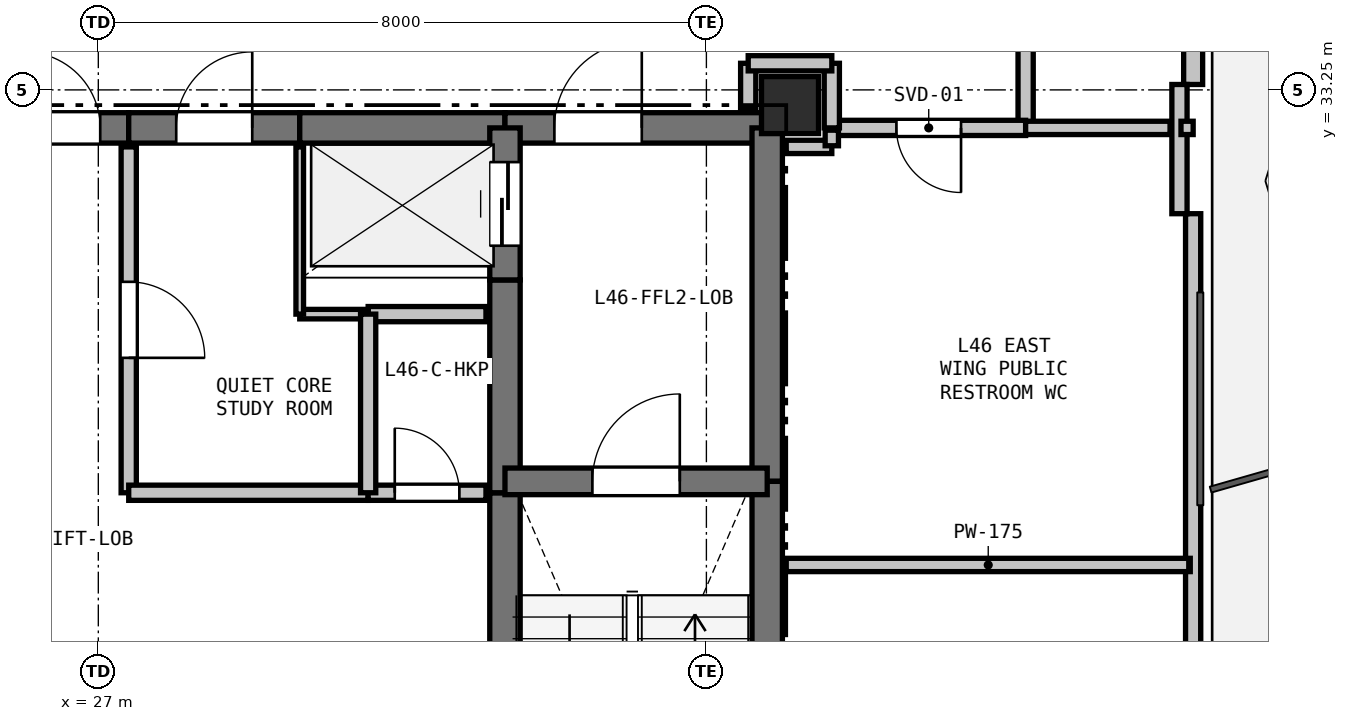
"""IFC4 building model, lengths in metres.
Left out: names, types, materials, properties, quantities, classifications, styles, units other than length and angle.
Written with IfcOpenShell. Run it as: python <this file> out.ifc"""

import sys

from ifc_helpers import new_model, si_unit, direction, frame, frame_2d, origin, origin_2d, place, context, subcontext, project, spatial, rectangle, extrude, element, fill, save


model = new_model("IFC4")
c1 = context("Model", 3, precision=1e-05, world=origin(), true_north=direction((0.0, 1.0)))
c2 = subcontext(c1, "Body", "Model", "MODEL_VIEW")
j1 = project(units=[si_unit("LENGTHUNIT", "METRE"), si_unit("PLANEANGLEUNIT", "RADIAN")], contexts=[c1])
p1 = place(None, origin())
s1 = spatial("IfcSite", under=j1, at=p1, CompositionType="ELEMENT")
p2 = place(p1, origin())
s2 = spatial("IfcBuilding", under=s1, at=p2, CompositionType="ELEMENT")
p3 = place(p2, frame((0.0, 0.0, 167.4)))
s3 = spatial("IfcBuildingStorey", under=s2, at=p3, CompositionType="ELEMENT", Elevation=167.4)
p4 = place(p3, frame((36.1, 33.05, 0.0), z_axis=(0.0, 0.0, 1.0), x_axis=(1.0, 0.0, 0.0)))
e1 = element("IfcColumn", 1, at=p4, inside=s3, PredefinedType="COLUMN", context=c2, shape_type="SweptSolid", body=[
    extrude(rectangle(XDim=0.75, YDim=0.75, at=origin_2d()), origin(), (0.0, 0.0, 1.0), 3.3),
])
p5 = place(p3, frame((41.404, 43.764, 0.0), z_axis=(0.0, 0.0, 1.0), x_axis=(0.0, -1.0, 0.0)))
e2 = element("IfcWall", 2, at=p5, inside=s3, PredefinedType="SOLIDWALL", context=c2, shape_type="SweptSolid", body=[
    extrude(rectangle(XDim=10.442, YDim=0.25, at=frame_2d((5.221, 0.0))), origin(), (0.0, 0.0, 1.0), 2.64),
])
p6 = place(p5, frame((1.879, 0.0, 0.0)))
e3 = element("IfcOpeningElement", 3, at=p6, cuts=e2, PredefinedType="OPENING", context=c2, shape_type="SweptSolid", body=[
    extrude(rectangle(XDim=1.0, YDim=2.1, at=frame_2d((0.5, 1.05))), frame((0.0, 0.135, 0.0), z_axis=(0.0, -1.0, 0.0), x_axis=(1.0, 0.0, 0.0)), (0.0, 0.0, 1.0), 0.27),
])
p7 = place(p3, frame((41.404, 31.621, 0.0), z_axis=(0.0, 0.0, 1.0), x_axis=(0.0, -1.0, 0.0)))
e4 = element("IfcWall", 4, at=p7, inside=s3, PredefinedType="PARAPET", context=c2, shape_type="SweptSolid", body=[
    extrude(rectangle(XDim=9.742, YDim=0.2, at=frame_2d((4.871, 0.0))), origin(), (0.0, 0.0, 1.0), 0.2),
])
p8 = place(p3, frame((41.224, 33.321, 0.0), z_axis=(0.0, 0.0, 1.0), x_axis=(0.0, -1.0, 0.0)))
e5 = element("IfcWall", 5, at=p8, inside=s3, PredefinedType="PARAPET", context=c2, shape_type="SweptSolid", body=[
    extrude(rectangle(XDim=1.7, YDim=0.2, at=frame_2d((0.85, 0.0))), origin(), (0.0, 0.0, 1.0), 2.64),
])
p9 = place(p3, frame((25.65, 32.75, 0.0), z_axis=(0.0, 0.0, 1.0), x_axis=(1.0, 0.0, 0.0)))
e6 = element("IfcWall", 6, at=p9, inside=s3, PredefinedType="SHEAR", context=c2, shape_type="SweptSolid", body=[
    extrude(rectangle(XDim=1.75, YDim=0.4, at=frame_2d((0.875, 0.0))), origin(), (0.0, 0.0, 1.0), 3.02),
])
p10 = place(p9, frame((0.375, 0.0, 0.0)))
e7 = element("IfcOpeningElement", 7, at=p10, cuts=e6, PredefinedType="OPENING", context=c2, shape_type="SweptSolid", body=[
    extrude(rectangle(XDim=1.0, YDim=2.15, at=frame_2d((0.5, 1.075))), frame((0.0, 0.21, 0.0), z_axis=(0.0, -1.0, 0.0), x_axis=(1.0, 0.0, 0.0)), (0.0, 0.0, 1.0), 0.42),
])
p11 = place(p3, frame((27.4, 32.75, 0.0), z_axis=(0.0, 0.0, 1.0), x_axis=(1.0, 0.0, 0.0)))
e8 = element("IfcWall", 8, at=p11, inside=s3, PredefinedType="SHEAR", context=c2, shape_type="SweptSolid", body=[
    extrude(rectangle(XDim=2.25, YDim=0.4, at=frame_2d((1.125, 0.0))), origin(), (0.0, 0.0, 1.0), 3.02),
])
p12 = place(p11, frame((0.625, 0.0, 0.0)))
e9 = element("IfcOpeningElement", 9, at=p12, cuts=e8, PredefinedType="OPENING", context=c2, shape_type="SweptSolid", body=[
    extrude(rectangle(XDim=1.0, YDim=2.15, at=frame_2d((0.5, 1.075))), frame((0.0, 0.21, 0.0), z_axis=(0.0, -1.0, 0.0), x_axis=(1.0, 0.0, 0.0)), (0.0, 0.0, 1.0), 0.42),
])
p13 = place(p3, frame((29.65, 32.75, 0.0), z_axis=(0.0, 0.0, 1.0), x_axis=(1.0, 0.0, 0.0)))
e10 = element("IfcWall", 10, at=p13, inside=s3, PredefinedType="SHEAR", context=c2, shape_type="SweptSolid", body=[
    extrude(rectangle(XDim=2.7, YDim=0.4, at=frame_2d((1.35, 0.0))), origin(), (0.0, 0.0, 1.0), 3.02),
])
p14 = place(p3, frame((32.35, 32.75, 0.0), z_axis=(0.0, 0.0, 1.0), x_axis=(1.0, 0.0, 0.0)))
e11 = element("IfcWall", 11, at=p14, inside=s3, PredefinedType="SHEAR", context=c2, shape_type="SweptSolid", body=[
    extrude(rectangle(XDim=3.45, YDim=0.4, at=frame_2d((1.725, 0.0))), origin(), (0.0, 0.0, 1.0), 3.02),
])
p15 = place(p14, frame((0.65, 0.0, 0.0)))
e12 = element("IfcOpeningElement", 12, at=p15, cuts=e11, PredefinedType="OPENING", context=c2, shape_type="SweptSolid", body=[
    extrude(rectangle(XDim=1.15, YDim=2.15, at=frame_2d((0.575, 1.075))), frame((0.0, 0.21, 0.0), z_axis=(0.0, -1.0, 0.0), x_axis=(1.0, 0.0, 0.0)), (0.0, 0.0, 1.0), 0.42),
])
p16 = place(p3, frame((35.8, 32.75, 0.0), z_axis=(0.0, 0.0, 1.0), x_axis=(0.0, -1.0, 0.0)))
e13 = element("IfcWall", 13, at=p16, inside=s3, PredefinedType="SHEAR", context=c2, shape_type="SweptSolid", body=[
    extrude(rectangle(XDim=4.65, YDim=0.4, at=frame_2d((2.325, 0.0))), origin(), (0.0, 0.0, 1.0), 3.02),
])
p17 = place(p3, frame((35.8, 28.1, 0.0), z_axis=(0.0, 0.0, 1.0), x_axis=(0.0, -1.0, 0.0)))
e14 = element("IfcWall", 14, at=p17, inside=s3, PredefinedType="SHEAR", context=c2, shape_type="SweptSolid", body=[
    extrude(rectangle(XDim=7.35, YDim=0.4, at=frame_2d((3.675, 0.0))), origin(), (0.0, 0.0, 1.0), 3.02),
])
p18 = place(p3, frame((32.35, 25.55, 0.0), z_axis=(0.0, 0.0, 1.0), x_axis=(0.0, 1.0, 0.0)))
e15 = element("IfcWall", 15, at=p18, inside=s3, PredefinedType="SHEAR", context=c2, shape_type="SweptSolid", body=[
    extrude(rectangle(XDim=2.4, YDim=0.4, at=frame_2d((1.2, 0.0))), origin(), (0.0, 0.0, 1.0), 3.02),
])
p19 = place(p3, frame((32.35, 27.95, 0.0), z_axis=(0.0, 0.0, 1.0), x_axis=(0.0, 1.0, 0.0)))
e16 = element("IfcWall", 16, at=p19, inside=s3, PredefinedType="SHEAR", context=c2, shape_type="SweptSolid", body=[
    extrude(rectangle(XDim=2.8, YDim=0.4, at=frame_2d((1.4, 0.0))), origin(), (0.0, 0.0, 1.0), 3.02),
])
p20 = place(p3, frame((32.35, 30.75, 0.0), z_axis=(0.0, 0.0, 1.0), x_axis=(0.0, 1.0, 0.0)))
e17 = element("IfcWall", 17, at=p20, inside=s3, PredefinedType="SHEAR", context=c2, shape_type="SweptSolid", body=[
    extrude(rectangle(XDim=2.0, YDim=0.4, at=frame_2d((1.0, 0.0))), origin(), (0.0, 0.0, 1.0), 3.02),
])
p21 = place(p20, frame((0.45, 0.0, 0.0)))
e18 = element("IfcOpeningElement", 18, at=p21, cuts=e17, PredefinedType="OPENING", context=c2, shape_type="SweptSolid", body=[
    extrude(rectangle(XDim=1.1, YDim=2.15, at=frame_2d((0.55, 1.075))), frame((0.0, 0.21, 0.0), z_axis=(0.0, -1.0, 0.0), x_axis=(1.0, 0.0, 0.0)), (0.0, 0.0, 1.0), 0.42),
])
p22 = place(p3, frame((32.35, 28.1, 0.0), z_axis=(0.0, 0.0, 1.0), x_axis=(1.0, 0.0, 0.0)))
e19 = element("IfcWall", 19, at=p22, inside=s3, PredefinedType="SHEAR", context=c2, shape_type="SweptSolid", body=[
    extrude(rectangle(XDim=3.45, YDim=0.35, at=frame_2d((1.725, 0.0))), origin(), (0.0, 0.0, 1.0), 3.02),
])
p23 = place(p22, frame((1.15, 0.0, 0.0)))
e20 = element("IfcOpeningElement", 20, at=p23, cuts=e19, PredefinedType="OPENING", context=c2, shape_type="SweptSolid", body=[
    extrude(rectangle(XDim=1.15, YDim=2.15, at=frame_2d((0.575, 1.075))), frame((0.0, 0.185, 0.0), z_axis=(0.0, -1.0, 0.0), x_axis=(1.0, 0.0, 0.0)), (0.0, 0.0, 1.0), 0.37),
])
p24 = place(p3, frame((32.1, 30.3, 0.0), z_axis=(0.0, 0.0, 1.0), x_axis=(-1.0, 0.0, 0.0)))
e21 = element("IfcWall", 21, at=p24, inside=s3, PredefinedType="PARTITIONING", context=c2, shape_type="SweptSolid", body=[
    extrude(rectangle(XDim=1.55, YDim=0.2, at=frame_2d((0.775, 0.0))), origin(), (0.0, 0.0, 1.0), 3.02),
])
p25 = place(p3, frame((30.55, 30.3, 0.0), z_axis=(0.0, 0.0, 1.0), x_axis=(-1.0, 0.0, 0.0)))
e22 = element("IfcWall", 22, at=p25, inside=s3, PredefinedType="PARTITIONING", context=c2, shape_type="SweptSolid", body=[
    extrude(rectangle(XDim=0.9, YDim=0.125, at=frame_2d((0.45, 0.0))), origin(), (0.0, 0.0, 1.0), 3.02),
])
p26 = place(p3, frame((29.65, 30.3, 0.0), z_axis=(0.0, 0.0, 1.0), x_axis=(0.0, 1.0, 0.0)))
e23 = element("IfcWall", 23, at=p26, inside=s3, PredefinedType="PARTITIONING", context=c2, shape_type="SweptSolid", body=[
    extrude(rectangle(XDim=2.2, YDim=0.1, at=frame_2d((1.1, 0.0))), origin(), (0.0, 0.0, 1.0), 3.02),
])
p27 = place(p3, frame((27.4, 32.5, 0.0), z_axis=(0.0, 0.0, 1.0), x_axis=(0.0, -1.0, 0.0)))
e24 = element("IfcWall", 24, at=p27, inside=s3, PredefinedType="PARTITIONING", context=c2, shape_type="SweptSolid", body=[
    extrude(rectangle(XDim=4.55, YDim=0.2, at=frame_2d((2.275, 0.0))), origin(), (0.0, 0.0, 1.0), 3.02),
])
p28 = place(p27, frame((1.775, 0.0, 0.0)))
e25 = element("IfcOpeningElement", 25, at=p28, cuts=e24, PredefinedType="OPENING", context=c2, shape_type="SweptSolid", body=[
    extrude(rectangle(XDim=1.0, YDim=2.15, at=frame_2d((0.5, 1.075))), frame((0.0, 0.11, 0.0), z_axis=(0.0, -1.0, 0.0), x_axis=(1.0, 0.0, 0.0)), (0.0, 0.0, 1.0), 0.22),
])
p29 = place(p3, frame((27.4, 27.95, 0.0), z_axis=(0.0, 0.0, 1.0), x_axis=(1.0, 0.0, 0.0)))
e26 = element("IfcWall", 26, at=p29, inside=s3, PredefinedType="PARTITIONING", context=c2, shape_type="SweptSolid", body=[
    extrude(rectangle(XDim=3.15, YDim=0.2, at=frame_2d((1.575, 0.0))), origin(), (0.0, 0.0, 1.0), 3.02),
])
p30 = place(p3, frame((30.55, 27.95, 0.0), z_axis=(0.0, 0.0, 1.0), x_axis=(1.0, 0.0, 0.0)))
e27 = element("IfcWall", 27, at=p30, inside=s3, PredefinedType="PARTITIONING", context=c2, shape_type="SweptSolid", body=[
    extrude(rectangle(XDim=1.55, YDim=0.2, at=frame_2d((0.775, 0.0))), origin(), (0.0, 0.0, 1.0), 3.02),
])
p31 = place(p30, frame((0.35, 0.0, 0.0)))
e28 = element("IfcOpeningElement", 28, at=p31, cuts=e27, PredefinedType="OPENING", context=c2, shape_type="SweptSolid", body=[
    extrude(rectangle(XDim=0.85, YDim=2.1, at=frame_2d((0.425, 1.05))), frame((0.0, 0.11, 0.0), z_axis=(0.0, -1.0, 0.0), x_axis=(1.0, 0.0, 0.0)), (0.0, 0.0, 1.0), 0.22),
])
p32 = place(p3, frame((35.55, 33.6, 0.0), z_axis=(0.0, 0.0, 1.0), x_axis=(0.0, -1.0, 0.0)))
e29 = element("IfcWall", 29, at=p32, inside=s3, PredefinedType="PARTITIONING", context=c2, shape_type="SweptSolid", body=[
    extrude(rectangle(XDim=0.6, YDim=0.2, at=frame_2d((0.3, 0.0))), origin(), (0.0, 0.0, 1.0), 2.545),
])
p33 = place(p3, frame((39.2, 35.35, 0.0), z_axis=(0.0, 0.0, 1.0), x_axis=(0.0, -1.0, 0.0)))
e30 = element("IfcWall", 30, at=p33, inside=s3, PredefinedType="PARTITIONING", context=c2, shape_type="SweptSolid", body=[
    extrude(rectangle(XDim=2.6, YDim=0.2, at=frame_2d((1.3, 0.0))), origin(), (0.0, 0.0, 1.0), 3.02),
])
p34 = place(p3, frame((39.2, 32.75, 0.0), z_axis=(0.0, 0.0, 1.0), x_axis=(-1.0, 0.0, 0.0)))
e31 = element("IfcWall", 31, at=p34, inside=s3, PredefinedType="PARTITIONING", context=c2, shape_type="SweptSolid", body=[
    extrude(rectangle(XDim=2.55, YDim=0.2, at=frame_2d((1.275, 0.0))), origin(), (0.0, 0.0, 1.0), 3.02),
])
p35 = place(p34, frame((0.85, 0.0, 0.0)))
e32 = element("IfcOpeningElement", 32, at=p35, cuts=e31, PredefinedType="OPENING", context=c2, shape_type="SweptSolid", body=[
    extrude(rectangle(XDim=0.85, YDim=2.1, at=frame_2d((0.425, 1.05))), frame((0.0, 0.11, 0.0), z_axis=(0.0, -1.0, 0.0), x_axis=(1.0, 0.0, 0.0)), (0.0, 0.0, 1.0), 0.22),
])
p36 = place(p3, frame((36.65, 32.75, 0.0), z_axis=(0.0, 0.0, 1.0), x_axis=(0.0, 1.0, 0.0)))
e33 = element("IfcWall", 33, at=p36, inside=s3, PredefinedType="PARTITIONING", context=c2, shape_type="SweptSolid", body=[
    extrude(rectangle(XDim=0.85, YDim=0.2, at=frame_2d((0.425, 0.0))), origin(), (0.0, 0.0, 1.0), 2.469),
])
p37 = place(p3, frame((36.65, 33.6, 0.0), z_axis=(0.0, 0.0, 1.0), x_axis=(-1.0, 0.0, 0.0)))
e34 = element("IfcWall", 34, at=p37, inside=s3, PredefinedType="PARTITIONING", context=c2, shape_type="SweptSolid", body=[
    extrude(rectangle(XDim=1.1, YDim=0.2, at=frame_2d((0.55, 0.0))), origin(), (0.0, 0.0, 1.0), 2.469),
])
p38 = place(p3, frame((36.05, 32.5, 0.0), z_axis=(0.0, 0.0, 1.0), x_axis=(1.0, 0.0, 0.0)))
e35 = element("IfcWall", 35, at=p38, inside=s3, PredefinedType="PLUMBINGWALL", context=c2, shape_type="SweptSolid", body=[
    extrude(rectangle(XDim=0.6, YDim=0.175, at=frame_2d((0.3, 0.0))), origin(), (0.0, 0.0, 1.0), 2.545),
])
p39 = place(p3, frame((36.65, 32.515, 0.0), z_axis=(0.0, 0.0, 1.0), x_axis=(0.0, 1.0, 0.0)))
e36 = element("IfcWall", 36, at=p39, inside=s3, PredefinedType="PLUMBINGWALL", context=c2, shape_type="SweptSolid", body=[
    extrude(rectangle(XDim=0.205, YDim=0.175, at=frame_2d((0.103, 0.0))), origin(), (0.0, 0.0, 1.0), 3.02),
])
p40 = place(p3, frame((39.2, 32.75, 0.0), z_axis=(0.0, 0.0, 1.0), x_axis=(1.0, 0.0, 0.0)))
e37 = element("IfcWall", 37, at=p40, inside=s3, PredefinedType="PLUMBINGWALL", context=c2, shape_type="SweptSolid", body=[
    extrude(rectangle(XDim=1.9, YDim=0.175, at=frame_2d((0.95, 0.0))), origin(), (0.0, 0.0, 1.0), 2.365),
])
p41 = place(p3, frame((41.244, 32.75, 0.0), z_axis=(0.0, 0.0, 1.0), x_axis=(1.0, 0.0, 0.0)))
e38 = element("IfcWall", 38, at=p41, inside=s3, PredefinedType="PLUMBINGWALL", context=c2, shape_type="SweptSolid", body=[
    extrude(rectangle(XDim=0.16, YDim=0.175, at=frame_2d((0.08, 0.0))), origin(), (0.0, 0.0, 1.0), 3.02),
])
p42 = place(p3, frame((41.366, 27.0, 0.0), z_axis=(0.0, 0.0, 1.0), x_axis=(-1.0, 0.0, 0.0)))
e39 = element("IfcWall", 39, at=p42, inside=s3, PredefinedType="PLUMBINGWALL", context=c2, shape_type="SweptSolid", body=[
    extrude(rectangle(XDim=5.316, YDim=0.175, at=frame_2d((2.658, 0.0))), origin(), (0.0, 0.0, 1.0), 2.365),
])
p43 = place(p3, frame((30.55, 30.3, 0.0), z_axis=(0.0, 0.0, 1.0), x_axis=(0.0, -1.0, 0.0)))
e40 = element("IfcWall", 40, at=p43, inside=s3, PredefinedType="PARTITIONING", context=c2, shape_type="SweptSolid", body=[
    extrude(rectangle(XDim=2.35, YDim=0.2, at=frame_2d((1.175, 0.0))), origin(), (0.0, 0.0, 1.0), 3.02),
])
p44 = place(p10, origin())
e41 = element("IfcDoor", 41, at=p44, inside=s3, OperationType="SINGLE_SWING_LEFT", PredefinedType="DOOR", context=c2, shape_type="SweptSolid", body=[
    extrude(rectangle(XDim=1.0, YDim=2.15, at=frame_2d((0.5, 1.075))), frame((0.0, 0.025, 0.0), z_axis=(0.0, -1.0, 0.0), x_axis=(1.0, 0.0, 0.0)), (0.0, 0.0, 1.0), 0.05),
])
fill(e7, e41)
p45 = place(p21, origin())
e42 = element("IfcDoor", 42, at=p45, inside=s3, OperationType="SLIDING_TO_LEFT", PredefinedType="DOOR", context=c2, shape_type="SweptSolid", body=[
    extrude(rectangle(XDim=1.1, YDim=2.15, at=frame_2d((0.55, 1.075))), frame((0.0, 0.025, 0.0), z_axis=(0.0, -1.0, 0.0), x_axis=(1.0, 0.0, 0.0)), (0.0, 0.0, 1.0), 0.05),
])
fill(e18, e42)
p46 = place(p23, origin())
e43 = element("IfcDoor", 43, at=p46, inside=s3, OperationType="SINGLE_SWING_RIGHT", PredefinedType="DOOR", context=c2, shape_type="SweptSolid", body=[
    extrude(rectangle(XDim=1.15, YDim=2.15, at=frame_2d((0.575, 1.075))), frame((0.0, 0.025, 0.0), z_axis=(0.0, -1.0, 0.0), x_axis=(1.0, 0.0, 0.0)), (0.0, 0.0, 1.0), 0.05),
])
fill(e20, e43)
p47 = place(p15, origin())
e44 = element("IfcDoor", 44, at=p47, inside=s3, OperationType="SINGLE_SWING_RIGHT", PredefinedType="DOOR", context=c2, shape_type="SweptSolid", body=[
    extrude(rectangle(XDim=1.15, YDim=2.15, at=frame_2d((0.575, 1.075))), frame((0.0, 0.025, 0.0), z_axis=(0.0, -1.0, 0.0), x_axis=(1.0, 0.0, 0.0)), (0.0, 0.0, 1.0), 0.05),
])
fill(e12, e44)
p48 = place(p28, origin())
e45 = element("IfcDoor", 45, at=p48, inside=s3, OperationType="SINGLE_SWING_RIGHT", PredefinedType="DOOR", context=c2, shape_type="SweptSolid", body=[
    extrude(rectangle(XDim=1.0, YDim=2.15, at=frame_2d((0.5, 1.075))), frame((0.0, 0.025, 0.0), z_axis=(0.0, -1.0, 0.0), x_axis=(1.0, 0.0, 0.0)), (0.0, 0.0, 1.0), 0.05),
])
fill(e25, e45)
p49 = place(p31, origin())
e46 = element("IfcDoor", 46, at=p49, inside=s3, OperationType="SINGLE_SWING_LEFT", PredefinedType="DOOR", context=c2, shape_type="SweptSolid", body=[
    extrude(rectangle(XDim=0.85, YDim=2.1, at=frame_2d((0.425, 1.05))), frame((0.0, 0.025, 0.0), z_axis=(0.0, -1.0, 0.0), x_axis=(1.0, 0.0, 0.0)), (0.0, 0.0, 1.0), 0.05),
])
fill(e28, e46)
p50 = place(p35, origin())
e47 = element("IfcDoor", 47, at=p50, inside=s3, OperationType="SINGLE_SWING_LEFT", PredefinedType="DOOR", context=c2, shape_type="SweptSolid", body=[
    extrude(rectangle(XDim=0.85, YDim=2.1, at=frame_2d((0.425, 1.05))), frame((0.0, 0.025, 0.0), z_axis=(0.0, -1.0, 0.0), x_axis=(1.0, 0.0, 0.0)), (0.0, 0.0, 1.0), 0.05),
])
fill(e32, e47)
p51 = place(p12, origin())
e48 = element("IfcDoor", 48, at=p51, inside=s3, OperationType="SINGLE_SWING_RIGHT", PredefinedType="DOOR", context=c2, shape_type="SweptSolid", body=[
    extrude(rectangle(XDim=1.0, YDim=2.15, at=frame_2d((0.5, 1.075))), frame((0.0, 0.025, 0.0), z_axis=(0.0, -1.0, 0.0), x_axis=(1.0, 0.0, 0.0)), (0.0, 0.0, 1.0), 0.05),
])
fill(e9, e48)
save(model, sys.argv[1])
